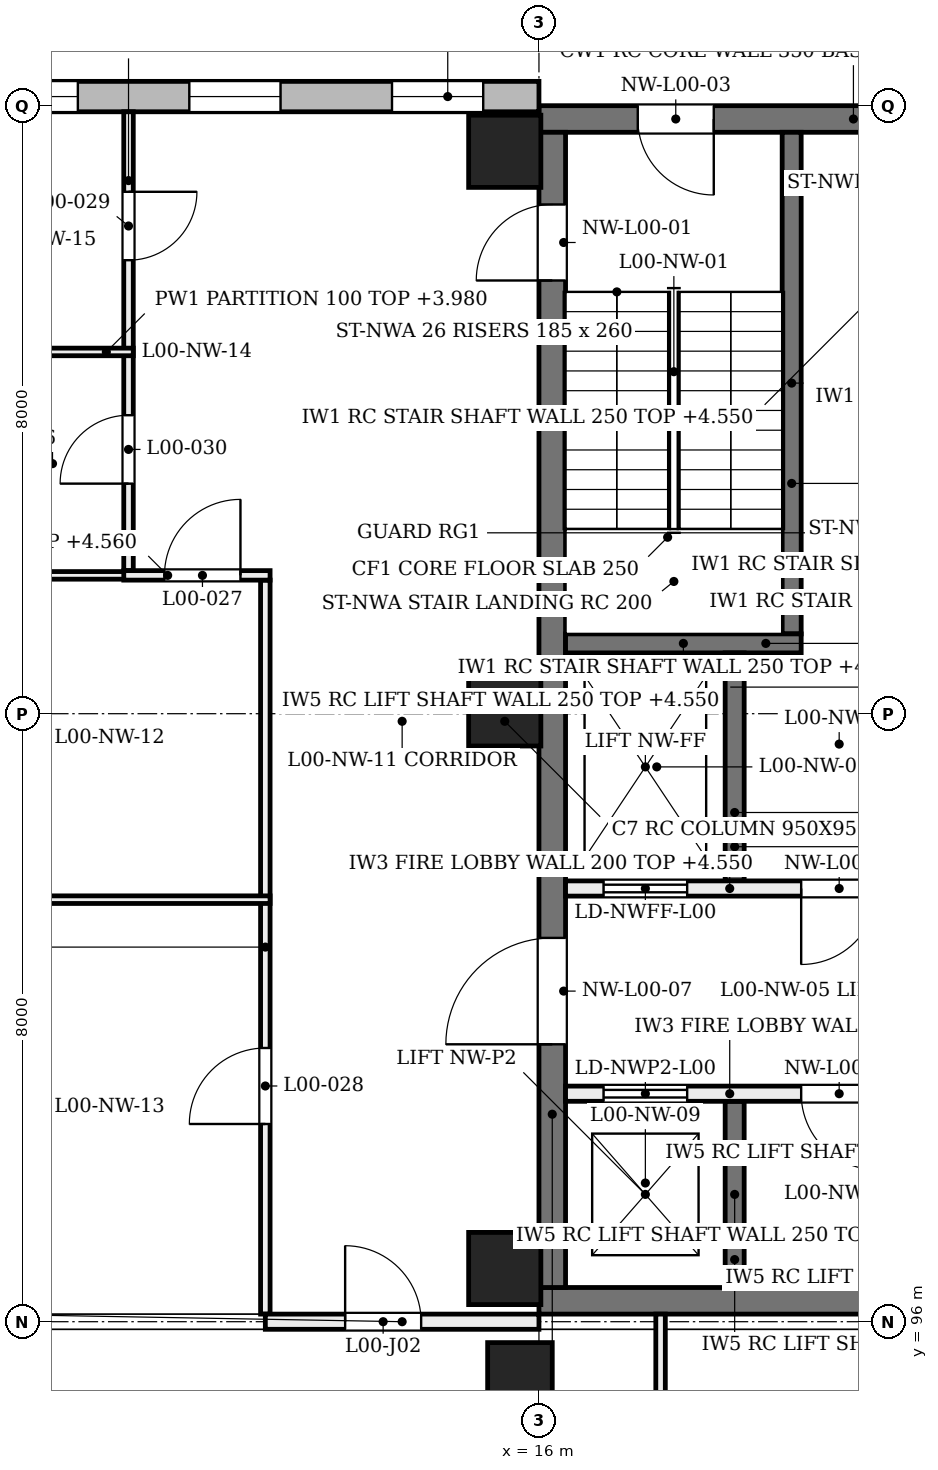
"""IFC4 building model, lengths in metres.
Left out: names, types, materials, properties, quantities, classifications, styles, units other than length and angle.
Written with IfcOpenShell. Run it as: python <this file> out.ifc"""

import sys

from ifc_helpers import new_model, si_unit, direction, frame, frame_2d, origin, origin_2d, place, context, subcontext, project, spatial, rectangle, extrude, element, fill, save


model = new_model("IFC4")
c1 = context("Model", 3, precision=1e-05, world=origin(), true_north=direction((0.0, 1.0)))
c2 = subcontext(c1, "Body", "Model", "MODEL_VIEW")
j1 = project(units=[si_unit("LENGTHUNIT", "METRE"), si_unit("PLANEANGLEUNIT", "RADIAN")], contexts=[c1])
p1 = place(None, origin())
s1 = spatial("IfcSite", under=j1, at=p1, CompositionType="ELEMENT")
p2 = place(p1, origin())
s2 = spatial("IfcBuilding", under=s1, at=p2, CompositionType="ELEMENT")
p3 = place(p2, origin())
s3 = spatial("IfcBuildingStorey", under=s2, at=p3, CompositionType="ELEMENT", Elevation=0.0)
p4 = place(p3, frame((16.0, 96.275, -1.6), z_axis=(0.0, 0.0, 1.0), x_axis=(1.0, 0.0, 0.0)))
e1 = element("IfcWall", 1, at=p4, inside=s3, PredefinedType="SHEAR", context=c2, shape_type="SweptSolid", body=[
    extrude(rectangle(XDim=8.275, YDim=0.35, at=frame_2d((4.137, 0.0))), origin(), (0.0, 0.0, 1.0), 6.18),
])
p5 = place(p3, frame((16.0, 111.825, -1.6), z_axis=(0.0, 0.0, 1.0), x_axis=(1.0, 0.0, 0.0)))
e2 = element("IfcWall", 2, at=p5, inside=s3, PredefinedType="SHEAR", context=c2, shape_type="SweptSolid", body=[
    extrude(rectangle(XDim=8.275, YDim=0.35, at=frame_2d((4.137, 0.0))), origin(), (0.0, 0.0, 1.0), 6.18),
])
p6 = place(p5, frame((1.3, 0.0, 1.6)))
e3 = element("IfcOpeningElement", 3, at=p6, cuts=e2, PredefinedType="OPENING", context=c2, shape_type="SweptSolid", body=[
    extrude(rectangle(XDim=1.0, YDim=2.1, at=frame_2d((0.5, 1.05))), frame((0.0, 0.185, 0.0), z_axis=(0.0, -1.0, 0.0), x_axis=(1.0, 0.0, 0.0)), (0.0, 0.0, 1.0), 0.37),
])
p7 = place(p5, frame((5.6, 0.0, 1.6)))
e4 = element("IfcOpeningElement", 4, at=p7, cuts=e2, PredefinedType="OPENING", context=c2, shape_type="SweptSolid", body=[
    extrude(rectangle(XDim=1.0, YDim=2.1, at=frame_2d((0.5, 1.05))), frame((0.0, 0.185, 0.0), z_axis=(0.0, -1.0, 0.0), x_axis=(1.0, 0.0, 0.0)), (0.0, 0.0, 1.0), 0.37),
])
p8 = place(p3, frame((16.175, 96.45, -1.6), z_axis=(0.0, 0.0, 1.0), x_axis=(0.0, 1.0, 0.0)))
e5 = element("IfcWall", 5, at=p8, inside=s3, PredefinedType="SHEAR", context=c2, shape_type="SweptSolid", body=[
    extrude(rectangle(XDim=15.2, YDim=0.35, at=frame_2d((7.6, 0.0))), origin(), (0.0, 0.0, 1.0), 6.18),
])
p9 = place(p8, frame((13.25, 0.0, 1.6)))
e6 = element("IfcOpeningElement", 6, at=p9, cuts=e5, PredefinedType="OPENING", context=c2, shape_type="SweptSolid", body=[
    extrude(rectangle(XDim=1.0, YDim=2.1, at=frame_2d((0.5, 1.05))), frame((0.0, 0.185, 0.0), z_axis=(0.0, -1.0, 0.0), x_axis=(1.0, 0.0, 0.0)), (0.0, 0.0, 1.0), 0.37),
])
p10 = place(p8, frame((3.2, 0.0, 1.6)))
e7 = element("IfcOpeningElement", 7, at=p10, cuts=e5, PredefinedType="OPENING", context=c2, shape_type="SweptSolid", body=[
    extrude(rectangle(XDim=1.4, YDim=2.1, at=frame_2d((0.7, 1.05))), frame((0.0, 0.185, 0.0), z_axis=(0.0, -1.0, 0.0), x_axis=(1.0, 0.0, 0.0)), (0.0, 0.0, 1.0), 0.37),
])
for number, where, z_axis, x_axis in (
    (8, (15.55, 96.7, -1.6), (0.0, 0.0, 1.0), (1.0, 0.0, 0.0)),
    (9, (15.55, 104.05, -1.6), (0.0, 0.0, 1.0), (1.0, 0.0, 0.0)),
    (10, (15.55, 111.4, -1.6), (0.0, 0.0, 1.0), (1.0, 0.0, 0.0)),
):
    element("IfcColumn", number, at=place(p3, frame(where, z_axis=z_axis, x_axis=x_axis)), inside=s3, PredefinedType="COLUMN", context=c2, shape_type="SweptSolid", body=[
        extrude(rectangle(XDim=0.95, YDim=0.95, at=origin_2d()), origin(), (0.0, 0.0, 1.0), 6.4),
    ])
p11 = place(p3, frame((16.333, 95.3, -1.6), z_axis=(-0.203937849881, 0.0, 0.978983837142), x_axis=(0.0, -1.0, 0.0)))
e11 = element("IfcColumn", 11, at=p11, inside=s3, PredefinedType="COLUMN", context=c2, shape_type="SweptSolid", body=[
    extrude(rectangle(XDim=0.85, YDim=0.85, at=origin_2d()), origin(), (0.0, 0.0, 1.0), 6.538),
])
p12 = place(p3, frame((8.0, 112.12, 0.0), z_axis=(0.0, 0.0, 1.0), x_axis=(1.0, 0.0, 0.0)))
e12 = element("IfcWall", 12, at=p12, inside=s3, PredefinedType="SOLIDWALL", context=c2, shape_type="SweptSolid", body=[
    extrude(rectangle(XDim=8.0, YDim=0.4, at=frame_2d((4.0, 0.0))), origin(), (0.0, 0.0, 1.0), 3.9),
])
p13 = place(p12, frame((0.733, 0.0, 1.9)))
e13 = element("IfcOpeningElement", 13, at=p13, cuts=e12, PredefinedType="OPENING", context=c2, shape_type="SweptSolid", body=[
    extrude(rectangle(XDim=1.2, YDim=1.5, at=frame_2d((0.6, 0.75))), frame((0.0, 0.21, 0.0), z_axis=(0.0, -1.0, 0.0), x_axis=(1.0, 0.0, 0.0)), (0.0, 0.0, 1.0), 0.42),
])
p14 = place(p12, frame((3.4, 0.0, 1.9)))
e14 = element("IfcOpeningElement", 14, at=p14, cuts=e12, PredefinedType="OPENING", context=c2, shape_type="SweptSolid", body=[
    extrude(rectangle(XDim=1.2, YDim=1.5, at=frame_2d((0.6, 0.75))), frame((0.0, 0.21, 0.0), z_axis=(0.0, -1.0, 0.0), x_axis=(1.0, 0.0, 0.0)), (0.0, 0.0, 1.0), 0.42),
])
p15 = place(p12, frame((6.067, 0.0, 1.9)))
e15 = element("IfcOpeningElement", 15, at=p15, cuts=e12, PredefinedType="OPENING", context=c2, shape_type="SweptSolid", body=[
    extrude(rectangle(XDim=1.2, YDim=1.5, at=frame_2d((0.6, 0.75))), frame((0.0, 0.21, 0.0), z_axis=(0.0, -1.0, 0.0), x_axis=(1.0, 0.0, 0.0)), (0.0, 0.0, 1.0), 0.42),
])
p16 = place(p3, frame((19.325, 111.65, 0.0), z_axis=(0.0, 0.0, 1.0), x_axis=(0.0, -1.0, 0.0)))
e16 = element("IfcWall", 16, at=p16, inside=s3, PredefinedType="SOLIDWALL", context=c2, shape_type="SweptSolid", body=[
    extrude(rectangle(XDim=6.6, YDim=0.25, at=frame_2d((3.3, 0.0))), origin(), (0.0, 0.0, 1.0), 4.55),
])
p17 = place(p3, frame((19.325, 111.65, -1.6), z_axis=(0.0, 0.0, 1.0), x_axis=(0.0, -1.0, 0.0)))
e17 = element("IfcWall", 17, at=p17, inside=s3, PredefinedType="SOLIDWALL", context=c2, shape_type="SweptSolid", body=[
    extrude(rectangle(XDim=6.6, YDim=0.25, at=frame_2d((3.3, 0.0))), origin(), (0.0, 0.0, 1.0), 1.35),
])
p18 = place(p3, frame((16.35, 104.925, 0.0), z_axis=(0.0, 0.0, 1.0), x_axis=(1.0, 0.0, 0.0)))
e18 = element("IfcWall", 18, at=p18, inside=s3, PredefinedType="SOLIDWALL", context=c2, shape_type="SweptSolid", body=[
    extrude(rectangle(XDim=3.1, YDim=0.25, at=frame_2d((1.55, 0.0))), origin(), (0.0, 0.0, 1.0), 4.55),
])
p19 = place(p3, frame((16.35, 104.925, -1.6), z_axis=(0.0, 0.0, 1.0), x_axis=(1.0, 0.0, 0.0)))
e19 = element("IfcWall", 19, at=p19, inside=s3, PredefinedType="SOLIDWALL", context=c2, shape_type="SweptSolid", body=[
    extrude(rectangle(XDim=3.1, YDim=0.25, at=frame_2d((1.55, 0.0))), origin(), (0.0, 0.0, 1.0), 1.35),
])
p20 = place(p3, frame((18.575, 104.8, 0.0), z_axis=(0.0, 0.0, 1.0), x_axis=(0.0, -1.0, 0.0)))
e20 = element("IfcWall", 20, at=p20, inside=s3, PredefinedType="SOLIDWALL", context=c2, shape_type="SweptSolid", body=[
    extrude(rectangle(XDim=3.0, YDim=0.25, at=frame_2d((1.5, 0.0))), origin(), (0.0, 0.0, 1.0), 4.55),
])
p21 = place(p3, frame((18.575, 104.8, -1.6), z_axis=(0.0, 0.0, 1.0), x_axis=(0.0, -1.0, 0.0)))
e21 = element("IfcWall", 21, at=p21, inside=s3, PredefinedType="SOLIDWALL", context=c2, shape_type="SweptSolid", body=[
    extrude(rectangle(XDim=3.0, YDim=0.25, at=frame_2d((1.5, 0.0))), origin(), (0.0, 0.0, 1.0), 1.35),
])
p22 = place(p3, frame((18.575, 98.9, 0.0), z_axis=(0.0, 0.0, 1.0), x_axis=(0.0, -1.0, 0.0)))
e22 = element("IfcWall", 22, at=p22, inside=s3, PredefinedType="SOLIDWALL", context=c2, shape_type="SweptSolid", body=[
    extrude(rectangle(XDim=2.45, YDim=0.25, at=frame_2d((1.225, 0.0))), origin(), (0.0, 0.0, 1.0), 4.55),
])
p23 = place(p3, frame((18.575, 98.9, -1.6), z_axis=(0.0, 0.0, 1.0), x_axis=(0.0, -1.0, 0.0)))
e23 = element("IfcWall", 23, at=p23, inside=s3, PredefinedType="SOLIDWALL", context=c2, shape_type="SweptSolid", body=[
    extrude(rectangle(XDim=2.45, YDim=0.25, at=frame_2d((1.225, 0.0))), origin(), (0.0, 0.0, 1.0), 1.35),
])
p24 = place(p3, frame((16.35, 101.7, 0.0), z_axis=(0.0, 0.0, 1.0), x_axis=(1.0, 0.0, 0.0)))
e24 = element("IfcWall", 24, at=p24, inside=s3, PredefinedType="SOLIDWALL", context=c2, shape_type="SweptSolid", body=[
    extrude(rectangle(XDim=7.2, YDim=0.2, at=frame_2d((3.6, 0.0))), origin(), (0.0, 0.0, 1.0), 4.55),
])
p25 = place(p24, frame((0.5, 0.0, 0.0)))
e25 = element("IfcOpeningElement", 25, at=p25, cuts=e24, PredefinedType="OPENING", context=c2, shape_type="SweptSolid", body=[
    extrude(rectangle(XDim=1.1, YDim=2.1, at=frame_2d((0.55, 1.05))), frame((0.0, 0.11, 0.0), z_axis=(0.0, -1.0, 0.0), x_axis=(1.0, 0.0, 0.0)), (0.0, 0.0, 1.0), 0.22),
])
p26 = place(p24, frame((5.6, 0.0, 0.0)))
e26 = element("IfcOpeningElement", 26, at=p26, cuts=e24, PredefinedType="OPENING", context=c2, shape_type="SweptSolid", body=[
    extrude(rectangle(XDim=1.1, YDim=2.1, at=frame_2d((0.55, 1.05))), frame((0.0, 0.11, 0.0), z_axis=(0.0, -1.0, 0.0), x_axis=(1.0, 0.0, 0.0)), (0.0, 0.0, 1.0), 0.22),
])
p27 = place(p24, frame((3.1, 0.0, 0.0)))
e27 = element("IfcOpeningElement", 27, at=p27, cuts=e24, PredefinedType="OPENING", context=c2, shape_type="SweptSolid", body=[
    extrude(rectangle(XDim=1.0, YDim=2.1, at=frame_2d((0.5, 1.05))), frame((0.0, 0.11, 0.0), z_axis=(0.0, -1.0, 0.0), x_axis=(1.0, 0.0, 0.0)), (0.0, 0.0, 1.0), 0.22),
])
p28 = place(p3, frame((16.35, 99.0, 0.0), z_axis=(0.0, 0.0, 1.0), x_axis=(1.0, 0.0, 0.0)))
e28 = element("IfcWall", 28, at=p28, inside=s3, PredefinedType="SOLIDWALL", context=c2, shape_type="SweptSolid", body=[
    extrude(rectangle(XDim=7.2, YDim=0.2, at=frame_2d((3.6, 0.0))), origin(), (0.0, 0.0, 1.0), 4.55),
])
p29 = place(p28, frame((0.5, 0.0, 0.0)))
e29 = element("IfcOpeningElement", 29, at=p29, cuts=e28, PredefinedType="OPENING", context=c2, shape_type="SweptSolid", body=[
    extrude(rectangle(XDim=1.1, YDim=2.1, at=frame_2d((0.55, 1.05))), frame((0.0, 0.11, 0.0), z_axis=(0.0, -1.0, 0.0), x_axis=(1.0, 0.0, 0.0)), (0.0, 0.0, 1.0), 0.22),
])
p30 = place(p28, frame((5.6, 0.0, 0.0)))
e30 = element("IfcOpeningElement", 30, at=p30, cuts=e28, PredefinedType="OPENING", context=c2, shape_type="SweptSolid", body=[
    extrude(rectangle(XDim=1.1, YDim=2.1, at=frame_2d((0.55, 1.05))), frame((0.0, 0.11, 0.0), z_axis=(0.0, -1.0, 0.0), x_axis=(1.0, 0.0, 0.0)), (0.0, 0.0, 1.0), 0.22),
])
p31 = place(p28, frame((3.1, 0.0, 0.0)))
e31 = element("IfcOpeningElement", 31, at=p31, cuts=e28, PredefinedType="OPENING", context=c2, shape_type="SweptSolid", body=[
    extrude(rectangle(XDim=1.0, YDim=2.1, at=frame_2d((0.5, 1.05))), frame((0.0, 0.11, 0.0), z_axis=(0.0, -1.0, 0.0), x_axis=(1.0, 0.0, 0.0)), (0.0, 0.0, 1.0), 0.22),
])
p32 = place(p3, frame((17.6, 91.8, 0.0), z_axis=(0.0, 0.0, 1.0), x_axis=(0.0, 1.0, 0.0)))
e32 = element("IfcWall", 32, at=p32, inside=s3, PredefinedType="PARTITIONING", context=c2, shape_type="SweptSolid", body=[
    extrude(rectangle(XDim=4.3, YDim=0.125, at=frame_2d((2.15, 0.0))), origin(), (0.0, 0.0, 1.0), 3.88),
])
p33 = place(p32, frame((1.475, 0.0, 0.0)))
e33 = element("IfcOpeningElement", 33, at=p33, cuts=e32, PredefinedType="OPENING", context=c2, shape_type="SweptSolid", body=[
    extrude(rectangle(XDim=1.15, YDim=2.1, at=frame_2d((0.575, 1.05))), frame((0.0, 0.073, 0.0), z_axis=(0.0, -1.0, 0.0), x_axis=(1.0, 0.0, 0.0)), (0.0, 0.0, 1.0), 0.145),
])
p34 = place(p3, frame((12.4, 96.1, 0.0), z_axis=(0.0, 0.0, 1.0), x_axis=(0.0, 1.0, 0.0)))
e34 = element("IfcWall", 34, at=p34, inside=s3, PredefinedType="PARTITIONING", context=c2, shape_type="SweptSolid", body=[
    extrude(rectangle(XDim=9.658, YDim=0.125, at=frame_2d((4.829, 0.0))), origin(), (0.0, 0.0, 1.0), 3.88),
])
p35 = place(p34, frame((2.501, 0.0, 0.0)))
e35 = element("IfcOpeningElement", 35, at=p35, cuts=e34, PredefinedType="OPENING", context=c2, shape_type="SweptSolid", body=[
    extrude(rectangle(XDim=1.0, YDim=2.1, at=frame_2d((0.5, 1.05))), frame((0.0, 0.073, 0.0), z_axis=(0.0, -1.0, 0.0), x_axis=(1.0, 0.0, 0.0)), (0.0, 0.0, 1.0), 0.145),
])
p36 = place(p3, frame((10.6, 105.883, 0.0), z_axis=(0.0, 0.0, 1.0), x_axis=(0.0, 1.0, 0.0)))
e36 = element("IfcWall", 36, at=p36, inside=s3, PredefinedType="PARTITIONING", context=c2, shape_type="SweptSolid", body=[
    extrude(rectangle(XDim=6.037, YDim=0.125, at=frame_2d((3.019, 0.0))), origin(), (0.0, 0.0, 1.0), 3.88),
])
p37 = place(p36, frame((4.084, 0.0, 0.0)))
e37 = element("IfcOpeningElement", 37, at=p37, cuts=e36, PredefinedType="OPENING", context=c2, shape_type="SweptSolid", body=[
    extrude(rectangle(XDim=0.9, YDim=2.1, at=frame_2d((0.45, 1.05))), frame((0.0, 0.073, 0.0), z_axis=(0.0, -1.0, 0.0), x_axis=(1.0, 0.0, 0.0)), (0.0, 0.0, 1.0), 0.145),
])
p38 = place(p36, frame((1.144, 0.0, 0.0)))
e38 = element("IfcOpeningElement", 38, at=p38, cuts=e36, PredefinedType="OPENING", context=c2, shape_type="SweptSolid", body=[
    extrude(rectangle(XDim=0.9, YDim=2.1, at=frame_2d((0.45, 1.05))), frame((0.0, 0.073, 0.0), z_axis=(0.0, -1.0, 0.0), x_axis=(1.0, 0.0, 0.0)), (0.0, 0.0, 1.0), 0.145),
])
p39 = place(p3, frame((8.08, 101.553, 0.0), z_axis=(0.0, 0.0, 1.0), x_axis=(1.0, 0.0, 0.0)))
e39 = element("IfcWall", 39, at=p39, inside=s3, PredefinedType="PARTITIONING", context=c2, shape_type="SweptSolid", body=[
    extrude(rectangle(XDim=4.382, YDim=0.1, at=frame_2d((2.191, 0.0))), origin(), (0.0, 0.0, 1.0), 3.88),
])
p40 = place(p3, frame((8.3, 105.82, 0.0), z_axis=(0.0, 0.0, 1.0), x_axis=(1.0, 0.0, 0.0)))
e40 = element("IfcWall", 40, at=p40, inside=s3, PredefinedType="PARTITIONING", context=c2, shape_type="SweptSolid", body=[
    extrude(rectangle(XDim=2.363, YDim=0.1, at=frame_2d((1.181, 0.0))), origin(), (0.0, 0.0, 1.0), 3.98),
])
p41 = place(p3, frame((10.538, 105.82, 0.0), z_axis=(0.0, 0.0, 1.0), x_axis=(1.0, 0.0, 0.0)))
e41 = element("IfcWall", 41, at=p41, inside=s3, PredefinedType="PARTITIONING", context=c2, shape_type="SweptSolid", body=[
    extrude(rectangle(XDim=1.925, YDim=0.125, at=frame_2d((0.962, 0.0))), origin(), (0.0, 0.0, 1.0), 4.56),
])
p42 = place(p41, frame((0.535, 0.0, 0.0)))
e42 = element("IfcOpeningElement", 42, at=p42, cuts=e41, PredefinedType="OPENING", context=c2, shape_type="SweptSolid", body=[
    extrude(rectangle(XDim=1.0, YDim=2.1, at=frame_2d((0.5, 1.05))), frame((0.0, 0.073, 0.0), z_axis=(0.0, -1.0, 0.0), x_axis=(1.0, 0.0, 0.0)), (0.0, 0.0, 1.0), 0.145),
])
p43 = place(p3, frame((8.3, 108.76, 0.0), z_axis=(0.0, 0.0, 1.0), x_axis=(1.0, 0.0, 0.0)))
e43 = element("IfcWall", 43, at=p43, inside=s3, PredefinedType="PARTITIONING", context=c2, shape_type="SweptSolid", body=[
    extrude(rectangle(XDim=2.363, YDim=0.1, at=frame_2d((1.181, 0.0))), origin(), (0.0, 0.0, 1.0), 3.98),
])
p44 = place(p3, frame((12.4, 96.0, 0.0), z_axis=(0.0, 0.0, 1.0), x_axis=(1.0, 0.0, 0.0)))
e44 = element("IfcWall", 44, at=p44, inside=s3, PredefinedType="PARTITIONING", context=c2, shape_type="SweptSolid", body=[
    extrude(rectangle(XDim=3.6, YDim=0.2, at=frame_2d((1.8, 0.0))), origin(), (0.0, 0.0, 1.0), 3.88),
])
p45 = place(p44, frame((1.05, 0.0, 0.0)))
e45 = element("IfcOpeningElement", 45, at=p45, cuts=e44, PredefinedType="OPENING", context=c2, shape_type="SweptSolid", body=[
    extrude(rectangle(XDim=1.0, YDim=2.1, at=frame_2d((0.5, 1.05))), frame((0.0, 0.11, 0.0), z_axis=(0.0, -1.0, 0.0), x_axis=(1.0, 0.0, 0.0)), (0.0, 0.0, 1.0), 0.22),
])
p46 = place(p13, origin())
e46 = element("IfcWindow", 46, at=p46, inside=s3, PartitioningType="SINGLE_PANEL", PredefinedType="WINDOW", context=c2, shape_type="SweptSolid", body=[
    extrude(rectangle(XDim=1.2, YDim=1.5, at=frame_2d((0.6, 0.75))), frame((0.0, 0.03, 0.0), z_axis=(0.0, -1.0, 0.0), x_axis=(1.0, 0.0, 0.0)), (0.0, 0.0, 1.0), 0.06),
])
fill(e13, e46)
p47 = place(p14, origin())
e47 = element("IfcWindow", 47, at=p47, inside=s3, PartitioningType="SINGLE_PANEL", PredefinedType="WINDOW", context=c2, shape_type="SweptSolid", body=[
    extrude(rectangle(XDim=1.2, YDim=1.5, at=frame_2d((0.6, 0.75))), frame((0.0, 0.03, 0.0), z_axis=(0.0, -1.0, 0.0), x_axis=(1.0, 0.0, 0.0)), (0.0, 0.0, 1.0), 0.06),
])
fill(e14, e47)
p48 = place(p15, origin())
e48 = element("IfcWindow", 48, at=p48, inside=s3, PartitioningType="SINGLE_PANEL", PredefinedType="WINDOW", context=c2, shape_type="SweptSolid", body=[
    extrude(rectangle(XDim=1.2, YDim=1.5, at=frame_2d((0.6, 0.75))), frame((0.0, 0.03, 0.0), z_axis=(0.0, -1.0, 0.0), x_axis=(1.0, 0.0, 0.0)), (0.0, 0.0, 1.0), 0.06),
])
fill(e15, e48)
p49 = place(p9, origin())
e49 = element("IfcDoor", 49, at=p49, inside=s3, OperationType="SINGLE_SWING_LEFT", PredefinedType="DOOR", context=c2, shape_type="SweptSolid", body=[
    extrude(rectangle(XDim=1.0, YDim=2.1, at=frame_2d((0.5, 1.05))), frame((0.0, 0.025, 0.0), z_axis=(0.0, -1.0, 0.0), x_axis=(1.0, 0.0, 0.0)), (0.0, 0.0, 1.0), 0.05),
])
fill(e6, e49)
p50 = place(p6, origin())
e50 = element("IfcDoor", 50, at=p50, inside=s3, OperationType="SINGLE_SWING_RIGHT", PredefinedType="DOOR", context=c2, shape_type="SweptSolid", body=[
    extrude(rectangle(XDim=1.0, YDim=2.1, at=frame_2d((0.5, 1.05))), frame((0.0, 0.025, 0.0), z_axis=(0.0, -1.0, 0.0), x_axis=(1.0, 0.0, 0.0)), (0.0, 0.0, 1.0), 0.05),
])
fill(e3, e50)
p51 = place(p25, frame((1.1, 0.0, 0.0), z_axis=(0.0, 0.0, 1.0), x_axis=(-1.0, 0.0, 0.0)))
e51 = element("IfcDoor", 51, at=p51, inside=s3, OperationType="DOUBLE_DOOR_SLIDING", PredefinedType="DOOR", context=c2, shape_type="SweptSolid", body=[
    extrude(rectangle(XDim=1.1, YDim=2.1, at=frame_2d((0.55, 1.05))), frame((0.0, 0.025, 0.0), z_axis=(0.0, -1.0, 0.0), x_axis=(1.0, 0.0, 0.0)), (0.0, 0.0, 1.0), 0.05),
])
fill(e25, e51)
p52 = place(p29, origin())
e52 = element("IfcDoor", 52, at=p52, inside=s3, OperationType="DOUBLE_DOOR_SLIDING", PredefinedType="DOOR", context=c2, shape_type="SweptSolid", body=[
    extrude(rectangle(XDim=1.1, YDim=2.1, at=frame_2d((0.55, 1.05))), frame((0.0, 0.025, 0.0), z_axis=(0.0, -1.0, 0.0), x_axis=(1.0, 0.0, 0.0)), (0.0, 0.0, 1.0), 0.05),
])
fill(e29, e52)
p53 = place(p27, frame((1.0, 0.0, 0.0), z_axis=(0.0, 0.0, 1.0), x_axis=(-1.0, 0.0, 0.0)))
e53 = element("IfcDoor", 53, at=p53, inside=s3, OperationType="SINGLE_SWING_LEFT", PredefinedType="DOOR", context=c2, shape_type="SweptSolid", body=[
    extrude(rectangle(XDim=1.0, YDim=2.1, at=frame_2d((0.5, 1.05))), frame((0.0, 0.025, 0.0), z_axis=(0.0, -1.0, 0.0), x_axis=(1.0, 0.0, 0.0)), (0.0, 0.0, 1.0), 0.05),
])
fill(e27, e53)
p54 = place(p31, origin())
e54 = element("IfcDoor", 54, at=p54, inside=s3, OperationType="SINGLE_SWING_RIGHT", PredefinedType="DOOR", context=c2, shape_type="SweptSolid", body=[
    extrude(rectangle(XDim=1.0, YDim=2.1, at=frame_2d((0.5, 1.05))), frame((0.0, 0.025, 0.0), z_axis=(0.0, -1.0, 0.0), x_axis=(1.0, 0.0, 0.0)), (0.0, 0.0, 1.0), 0.05),
])
fill(e31, e54)
p55 = place(p10, origin())
e55 = element("IfcDoor", 55, at=p55, inside=s3, OperationType="SINGLE_SWING_LEFT", PredefinedType="DOOR", context=c2, shape_type="SweptSolid", body=[
    extrude(rectangle(XDim=1.4, YDim=2.1, at=frame_2d((0.7, 1.05))), frame((0.0, 0.025, 0.0), z_axis=(0.0, -1.0, 0.0), x_axis=(1.0, 0.0, 0.0)), (0.0, 0.0, 1.0), 0.05),
])
fill(e7, e55)
p56 = place(p42, frame((1.0, 0.0, 0.0), z_axis=(0.0, 0.0, 1.0), x_axis=(-1.0, 0.0, 0.0)))
e56 = element("IfcDoor", 56, at=p56, inside=s3, OperationType="SINGLE_SWING_RIGHT", PredefinedType="DOOR", context=c2, shape_type="SweptSolid", body=[
    extrude(rectangle(XDim=1.0, YDim=2.1, at=frame_2d((0.5, 1.05))), frame((0.0, 0.025, 0.0), z_axis=(0.0, -1.0, 0.0), x_axis=(1.0, 0.0, 0.0)), (0.0, 0.0, 1.0), 0.05),
])
fill(e42, e56)
p57 = place(p35, origin())
e57 = element("IfcDoor", 57, at=p57, inside=s3, OperationType="SINGLE_SWING_LEFT", PredefinedType="DOOR", context=c2, shape_type="SweptSolid", body=[
    extrude(rectangle(XDim=1.0, YDim=2.1, at=frame_2d((0.5, 1.05))), frame((0.0, 0.025, 0.0), z_axis=(0.0, -1.0, 0.0), x_axis=(1.0, 0.0, 0.0)), (0.0, 0.0, 1.0), 0.05),
])
fill(e35, e57)
p58 = place(p37, origin())
e58 = element("IfcDoor", 58, at=p58, inside=s3, OperationType="SINGLE_SWING_RIGHT", PredefinedType="DOOR", context=c2, shape_type="SweptSolid", body=[
    extrude(rectangle(XDim=0.9, YDim=2.1, at=frame_2d((0.45, 1.05))), frame((0.0, 0.025, 0.0), z_axis=(0.0, -1.0, 0.0), x_axis=(1.0, 0.0, 0.0)), (0.0, 0.0, 1.0), 0.05),
])
fill(e37, e58)
p59 = place(p38, origin())
e59 = element("IfcDoor", 59, at=p59, inside=s3, OperationType="SINGLE_SWING_LEFT", PredefinedType="DOOR", context=c2, shape_type="SweptSolid", body=[
    extrude(rectangle(XDim=0.9, YDim=2.1, at=frame_2d((0.45, 1.05))), frame((0.0, 0.025, 0.0), z_axis=(0.0, -1.0, 0.0), x_axis=(1.0, 0.0, 0.0)), (0.0, 0.0, 1.0), 0.05),
])
fill(e38, e59)
p60 = place(p45, origin())
e60 = element("IfcDoor", 60, at=p60, inside=s3, OperationType="SINGLE_SWING_LEFT", PredefinedType="DOOR", context=c2, shape_type="SweptSolid", body=[
    extrude(rectangle(XDim=1.0, YDim=2.1, at=frame_2d((0.5, 1.05))), frame((0.0, 0.025, 0.0), z_axis=(0.0, -1.0, 0.0), x_axis=(1.0, 0.0, 0.0)), (0.0, 0.0, 1.0), 0.05),
])
fill(e45, e60)
save(model, sys.argv[1])
